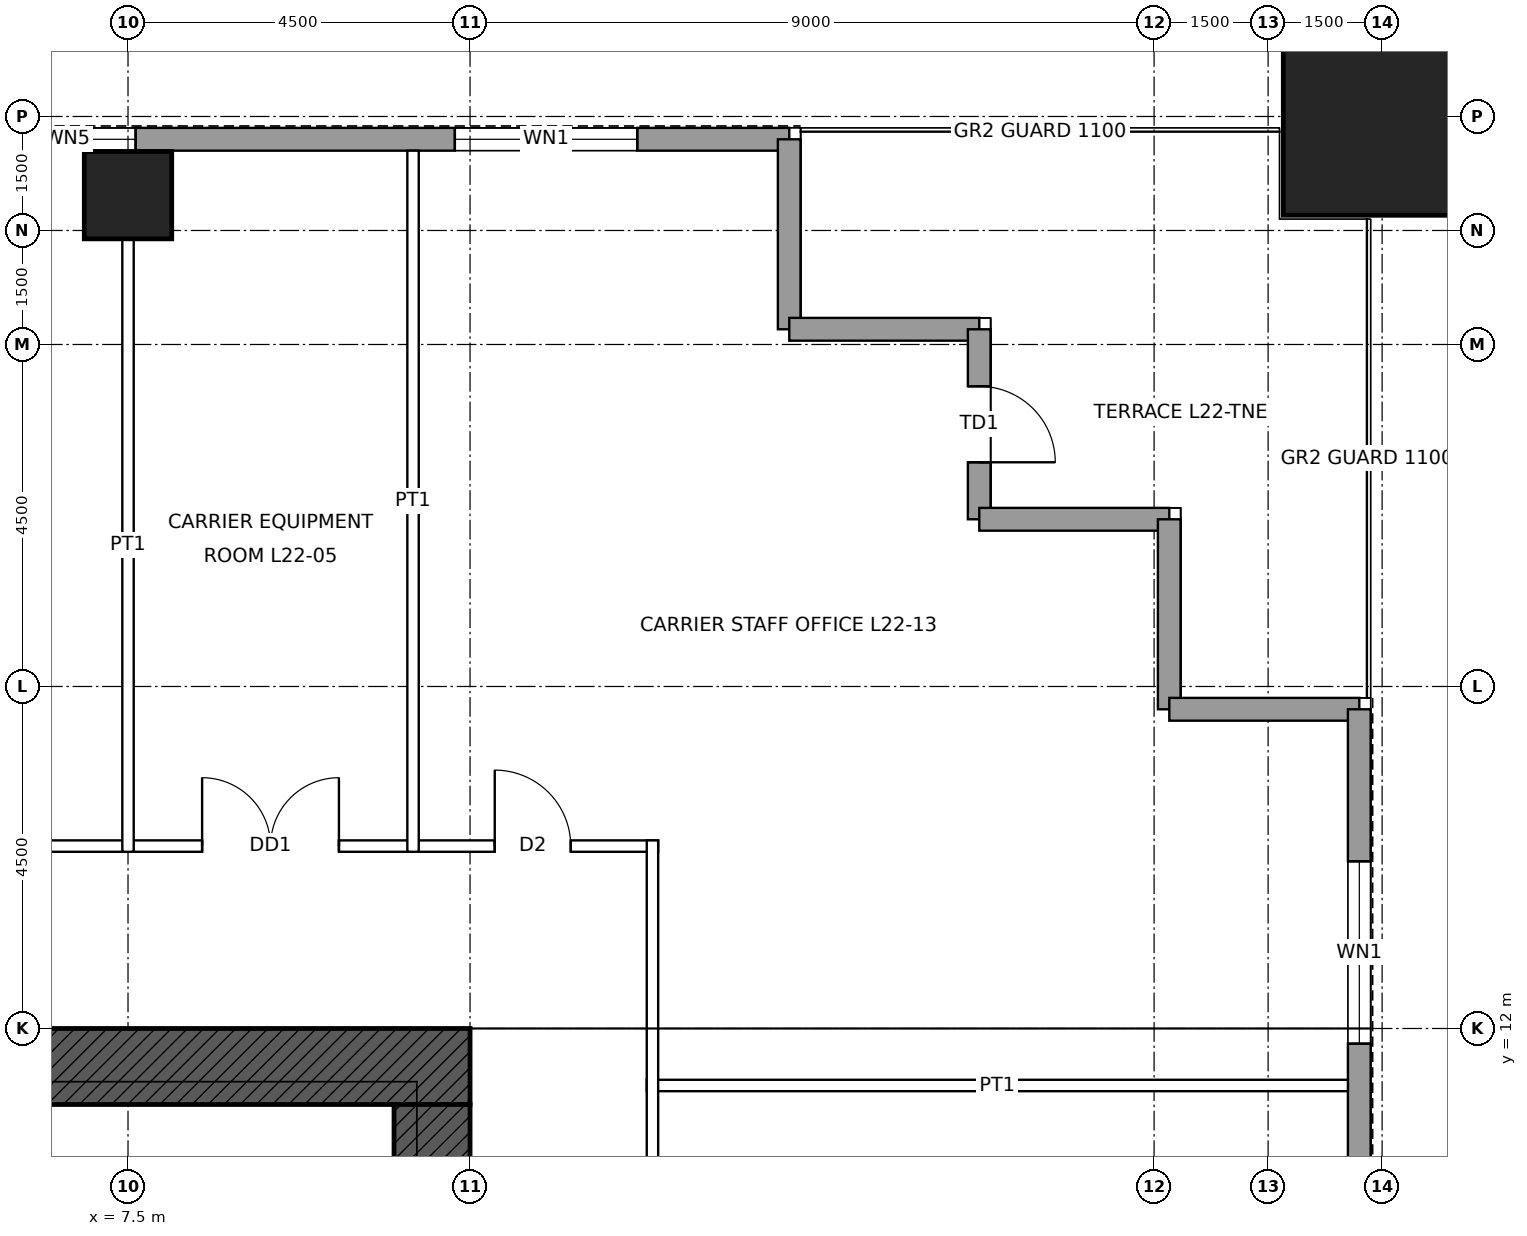
"""IFC4 building model, lengths in metres.
Left out: names, types, materials, properties, quantities, classifications, styles, units other than length and angle.
Written with IfcOpenShell. Run it as: python <this file> out.ifc"""

import sys

from ifc_helpers import new_model, si_unit, direction, frame, frame_2d, origin, origin_2d, place, context, subcontext, project, spatial, rectangle, hollow_rectangle, extrude, element, fill, save


model = new_model("IFC4")
c1 = context("Model", 3, precision=1e-05, world=origin(), true_north=direction((0.0, 1.0)))
c2 = subcontext(c1, "Body", "Model", "MODEL_VIEW")
j1 = project(units=[si_unit("LENGTHUNIT", "METRE"), si_unit("PLANEANGLEUNIT", "RADIAN")], contexts=[c1])
p1 = place(None, origin())
s1 = spatial("IfcSite", under=j1, at=p1, CompositionType="ELEMENT")
p2 = place(p1, origin())
s2 = spatial("IfcBuilding", under=s1, at=p2, CompositionType="ELEMENT")
p3 = place(p2, frame((0.0, 0.0, 113.4)))
s3 = spatial("IfcBuildingStorey", under=s2, at=p3, CompositionType="ELEMENT", Elevation=113.4)
p4 = place(p3, frame((24.0, 24.0, 0.0), z_axis=(0.0, 0.0, 1.0), x_axis=(1.0, 0.0, 0.0)))
e1 = element("IfcColumn", 1, at=p4, inside=s3, PredefinedType="COLUMN", context=c2, shape_type="SweptSolid", body=[
    extrude(hollow_rectangle(XDim=2.6, YDim=2.6, WallThickness=0.13, at=origin_2d()), origin(), (0.0, 0.0, 1.0), 4.5),
])
p5 = place(p3, frame((7.5, 22.965, 0.0), z_axis=(0.0, 0.0, 1.0), x_axis=(1.0, 0.0, 0.0)))
e2 = element("IfcColumn", 2, at=p5, inside=s3, PredefinedType="COLUMN", context=c2, shape_type="SweptSolid", body=[
    extrude(hollow_rectangle(XDim=1.15, YDim=1.15, WallThickness=0.075, at=origin_2d()), origin(), (0.0, 0.0, 1.0), 4.5),
])
p6 = place(p3, frame((-12.0, 11.5, 0.0), z_axis=(0.0, 0.0, 1.0), x_axis=(1.0, 0.0, 0.0)))
e3 = element("IfcWall", 3, at=p6, inside=s3, PredefinedType="SHEAR", context=c2, shape_type="SweptSolid", body=[
    extrude(rectangle(XDim=24.0, YDim=1.0, at=frame_2d((12.0, 0.0))), origin(), (0.0, 0.0, 1.0), 4.5),
])
p7 = place(p6, frame((6.25, 0.0, 0.0)))
e4 = element("IfcOpeningElement", 4, at=p7, cuts=e3, PredefinedType="OPENING", context=c2, shape_type="SweptSolid", body=[
    extrude(rectangle(XDim=1.0, YDim=2.4, at=frame_2d((0.5, 1.2))), frame((0.0, 0.51, 0.0), z_axis=(0.0, -1.0, 0.0), x_axis=(1.0, 0.0, 0.0)), (0.0, 0.0, 1.0), 1.02),
])
p8 = place(p6, frame((16.75, 0.0, 0.0)))
e5 = element("IfcOpeningElement", 5, at=p8, cuts=e3, PredefinedType="OPENING", context=c2, shape_type="SweptSolid", body=[
    extrude(rectangle(XDim=1.0, YDim=2.4, at=frame_2d((0.5, 1.2))), frame((0.0, 0.51, 0.0), z_axis=(0.0, -1.0, 0.0), x_axis=(1.0, 0.0, 0.0)), (0.0, 0.0, 1.0), 1.02),
])
p9 = place(p3, frame((11.5, 11.0, 0.0), z_axis=(0.0, 0.0, 1.0), x_axis=(0.0, -1.0, 0.0)))
e6 = element("IfcWall", 6, at=p9, inside=s3, PredefinedType="SHEAR", context=c2, shape_type="SweptSolid", body=[
    extrude(rectangle(XDim=22.0, YDim=1.0, at=frame_2d((11.0, 0.0))), origin(), (0.0, 0.0, 1.0), 4.5),
])
p10 = place(p9, frame((10.5, 0.0, 0.0)))
e7 = element("IfcOpeningElement", 7, at=p10, cuts=e6, PredefinedType="OPENING", context=c2, shape_type="SweptSolid", body=[
    extrude(rectangle(XDim=1.0, YDim=2.4, at=frame_2d((0.5, 1.2))), frame((0.0, 0.51, 0.0), z_axis=(0.0, -1.0, 0.0), x_axis=(1.0, 0.0, 0.0)), (0.0, 0.0, 1.0), 1.02),
])
p11 = place(p3, frame((-16.2, 23.7, 0.0), z_axis=(0.0, 0.0, 1.0), x_axis=(1.0, 0.0, 0.0)))
e8 = element("IfcWall", 8, at=p11, inside=s3, PredefinedType="SOLIDWALL", context=c2, shape_type="SweptSolid", body=[
    extrude(rectangle(XDim=32.4, YDim=0.3, at=frame_2d((16.2, 0.0))), origin(), (0.0, 0.0, 1.0), 4.3),
])
p12 = place(p11, frame((2.0, 0.0, 1.0)))
e9 = element("IfcOpeningElement", 9, at=p12, cuts=e8, PredefinedType="OPENING", context=c2, shape_type="SweptSolid", body=[
    extrude(rectangle(XDim=2.4, YDim=1.2, at=frame_2d((1.2, 0.6))), frame((0.0, 0.16, 0.0), z_axis=(0.0, -1.0, 0.0), x_axis=(1.0, 0.0, 0.0)), (0.0, 0.0, 1.0), 0.32),
])
p13 = place(p11, frame((8.6, 0.0, 1.0)))
e10 = element("IfcOpeningElement", 10, at=p13, cuts=e8, PredefinedType="OPENING", context=c2, shape_type="SweptSolid", body=[
    extrude(rectangle(XDim=1.8, YDim=1.2, at=frame_2d((0.9, 0.6))), frame((0.0, 0.16, 0.0), z_axis=(0.0, -1.0, 0.0), x_axis=(1.0, 0.0, 0.0)), (0.0, 0.0, 1.0), 0.32),
])
p14 = place(p11, frame((10.7, 0.0, 1.0)))
e11 = element("IfcOpeningElement", 11, at=p14, cuts=e8, PredefinedType="OPENING", context=c2, shape_type="SweptSolid", body=[
    extrude(rectangle(XDim=2.4, YDim=1.2, at=frame_2d((1.2, 0.6))), frame((0.0, 0.16, 0.0), z_axis=(0.0, -1.0, 0.0), x_axis=(1.0, 0.0, 0.0)), (0.0, 0.0, 1.0), 0.32),
])
p15 = place(p11, frame((13.4, 0.0, 1.0)))
e12 = element("IfcOpeningElement", 12, at=p15, cuts=e8, PredefinedType="OPENING", context=c2, shape_type="SweptSolid", body=[
    extrude(rectangle(XDim=2.4, YDim=1.2, at=frame_2d((1.2, 0.6))), frame((0.0, 0.16, 0.0), z_axis=(0.0, -1.0, 0.0), x_axis=(1.0, 0.0, 0.0)), (0.0, 0.0, 1.0), 0.32),
])
p16 = place(p11, frame((16.6, 0.0, 1.0)))
e13 = element("IfcOpeningElement", 13, at=p16, cuts=e8, PredefinedType="OPENING", context=c2, shape_type="SweptSolid", body=[
    extrude(rectangle(XDim=2.4, YDim=1.2, at=frame_2d((1.2, 0.6))), frame((0.0, 0.16, 0.0), z_axis=(0.0, -1.0, 0.0), x_axis=(1.0, 0.0, 0.0)), (0.0, 0.0, 1.0), 0.32),
])
p17 = place(p11, frame((19.3, 0.0, 1.0)))
e14 = element("IfcOpeningElement", 14, at=p17, cuts=e8, PredefinedType="OPENING", context=c2, shape_type="SweptSolid", body=[
    extrude(rectangle(XDim=2.4, YDim=1.2, at=frame_2d((1.2, 0.6))), frame((0.0, 0.16, 0.0), z_axis=(0.0, -1.0, 0.0), x_axis=(1.0, 0.0, 0.0)), (0.0, 0.0, 1.0), 0.32),
])
p18 = place(p11, frame((22.0, 0.0, 1.0)))
e15 = element("IfcOpeningElement", 15, at=p18, cuts=e8, PredefinedType="OPENING", context=c2, shape_type="SweptSolid", body=[
    extrude(rectangle(XDim=1.8, YDim=1.2, at=frame_2d((0.9, 0.6))), frame((0.0, 0.16, 0.0), z_axis=(0.0, -1.0, 0.0), x_axis=(1.0, 0.0, 0.0)), (0.0, 0.0, 1.0), 0.32),
])
p19 = place(p11, frame((28.0, 0.0, 1.0)))
e16 = element("IfcOpeningElement", 16, at=p19, cuts=e8, PredefinedType="OPENING", context=c2, shape_type="SweptSolid", body=[
    extrude(rectangle(XDim=2.4, YDim=1.2, at=frame_2d((1.2, 0.6))), frame((0.0, 0.16, 0.0), z_axis=(0.0, -1.0, 0.0), x_axis=(1.0, 0.0, 0.0)), (0.0, 0.0, 1.0), 0.32),
])
for number, where, z_axis, x_axis in (
    (17, (16.2, 23.7, 0.0), (0.0, 0.0, 1.0), (0.0, -1.0, 0.0)),
    (18, (16.2, 21.2, 0.0), (0.0, 0.0, 1.0), (1.0, 0.0, 0.0)),
):
    element("IfcWall", number, at=place(p3, frame(where, z_axis=z_axis, x_axis=x_axis)), inside=s3, PredefinedType="SOLIDWALL", context=c2, shape_type="SweptSolid", body=[
        extrude(rectangle(XDim=2.5, YDim=0.3, at=frame_2d((1.25, 0.0))), origin(), (0.0, 0.0, 1.0), 4.3),
    ])
p20 = place(p3, frame((18.7, 21.2, 0.0), z_axis=(0.0, 0.0, 1.0), x_axis=(0.0, -1.0, 0.0)))
e19 = element("IfcWall", 19, at=p20, inside=s3, PredefinedType="SOLIDWALL", context=c2, shape_type="SweptSolid", body=[
    extrude(rectangle(XDim=2.5, YDim=0.3, at=frame_2d((1.25, 0.0))), origin(), (0.0, 0.0, 1.0), 4.3),
])
p21 = place(p20, frame((0.75, 0.0, 0.0)))
e20 = element("IfcOpeningElement", 20, at=p21, cuts=e19, PredefinedType="OPENING", context=c2, shape_type="SweptSolid", body=[
    extrude(rectangle(XDim=1.0, YDim=2.4, at=frame_2d((0.5, 1.2))), frame((0.0, 0.16, 0.0), z_axis=(0.0, -1.0, 0.0), x_axis=(1.0, 0.0, 0.0)), (0.0, 0.0, 1.0), 0.32),
])
for number, where, z_axis, x_axis in (
    (21, (18.7, 18.7, 0.0), (0.0, 0.0, 1.0), (1.0, 0.0, 0.0)),
    (22, (21.2, 18.7, 0.0), (0.0, 0.0, 1.0), (0.0, -1.0, 0.0)),
    (23, (21.2, 16.2, 0.0), (0.0, 0.0, 1.0), (1.0, 0.0, 0.0)),
):
    element("IfcWall", number, at=place(p3, frame(where, z_axis=z_axis, x_axis=x_axis)), inside=s3, PredefinedType="SOLIDWALL", context=c2, shape_type="SweptSolid", body=[
        extrude(rectangle(XDim=2.5, YDim=0.3, at=frame_2d((1.25, 0.0))), origin(), (0.0, 0.0, 1.0), 4.3),
    ])
p22 = place(p3, frame((23.7, 16.2, 0.0), z_axis=(0.0, 0.0, 1.0), x_axis=(0.0, -1.0, 0.0)))
e24 = element("IfcWall", 24, at=p22, inside=s3, PredefinedType="SOLIDWALL", context=c2, shape_type="SweptSolid", body=[
    extrude(rectangle(XDim=32.4, YDim=0.3, at=frame_2d((16.2, 0.0))), origin(), (0.0, 0.0, 1.0), 4.3),
])
p23 = place(p22, frame((2.0, 0.0, 1.0)))
e25 = element("IfcOpeningElement", 25, at=p23, cuts=e24, PredefinedType="OPENING", context=c2, shape_type="SweptSolid", body=[
    extrude(rectangle(XDim=2.4, YDim=1.2, at=frame_2d((1.2, 0.6))), frame((0.0, 0.16, 0.0), z_axis=(0.0, -1.0, 0.0), x_axis=(1.0, 0.0, 0.0)), (0.0, 0.0, 1.0), 0.32),
])
p24 = place(p22, frame((8.6, 0.0, 1.0)))
e26 = element("IfcOpeningElement", 26, at=p24, cuts=e24, PredefinedType="OPENING", context=c2, shape_type="SweptSolid", body=[
    extrude(rectangle(XDim=1.8, YDim=1.2, at=frame_2d((0.9, 0.6))), frame((0.0, 0.16, 0.0), z_axis=(0.0, -1.0, 0.0), x_axis=(1.0, 0.0, 0.0)), (0.0, 0.0, 1.0), 0.32),
])
p25 = place(p22, frame((10.7, 0.0, 1.0)))
e27 = element("IfcOpeningElement", 27, at=p25, cuts=e24, PredefinedType="OPENING", context=c2, shape_type="SweptSolid", body=[
    extrude(rectangle(XDim=2.4, YDim=1.2, at=frame_2d((1.2, 0.6))), frame((0.0, 0.16, 0.0), z_axis=(0.0, -1.0, 0.0), x_axis=(1.0, 0.0, 0.0)), (0.0, 0.0, 1.0), 0.32),
])
p26 = place(p22, frame((13.4, 0.0, 1.0)))
e28 = element("IfcOpeningElement", 28, at=p26, cuts=e24, PredefinedType="OPENING", context=c2, shape_type="SweptSolid", body=[
    extrude(rectangle(XDim=2.4, YDim=1.2, at=frame_2d((1.2, 0.6))), frame((0.0, 0.16, 0.0), z_axis=(0.0, -1.0, 0.0), x_axis=(1.0, 0.0, 0.0)), (0.0, 0.0, 1.0), 0.32),
])
p27 = place(p22, frame((16.6, 0.0, 1.0)))
e29 = element("IfcOpeningElement", 29, at=p27, cuts=e24, PredefinedType="OPENING", context=c2, shape_type="SweptSolid", body=[
    extrude(rectangle(XDim=2.4, YDim=1.2, at=frame_2d((1.2, 0.6))), frame((0.0, 0.16, 0.0), z_axis=(0.0, -1.0, 0.0), x_axis=(1.0, 0.0, 0.0)), (0.0, 0.0, 1.0), 0.32),
])
p28 = place(p22, frame((19.3, 0.0, 1.0)))
e30 = element("IfcOpeningElement", 30, at=p28, cuts=e24, PredefinedType="OPENING", context=c2, shape_type="SweptSolid", body=[
    extrude(rectangle(XDim=2.4, YDim=1.2, at=frame_2d((1.2, 0.6))), frame((0.0, 0.16, 0.0), z_axis=(0.0, -1.0, 0.0), x_axis=(1.0, 0.0, 0.0)), (0.0, 0.0, 1.0), 0.32),
])
p29 = place(p22, frame((22.0, 0.0, 1.0)))
e31 = element("IfcOpeningElement", 31, at=p29, cuts=e24, PredefinedType="OPENING", context=c2, shape_type="SweptSolid", body=[
    extrude(rectangle(XDim=1.8, YDim=1.2, at=frame_2d((0.9, 0.6))), frame((0.0, 0.16, 0.0), z_axis=(0.0, -1.0, 0.0), x_axis=(1.0, 0.0, 0.0)), (0.0, 0.0, 1.0), 0.32),
])
p30 = place(p22, frame((28.0, 0.0, 1.0)))
e32 = element("IfcOpeningElement", 32, at=p30, cuts=e24, PredefinedType="OPENING", context=c2, shape_type="SweptSolid", body=[
    extrude(rectangle(XDim=2.4, YDim=1.2, at=frame_2d((1.2, 0.6))), frame((0.0, 0.16, 0.0), z_axis=(0.0, -1.0, 0.0), x_axis=(1.0, 0.0, 0.0)), (0.0, 0.0, 1.0), 0.32),
])
p31 = place(p3, frame((14.325, 11.25, 0.0), z_axis=(0.0, 0.0, 1.0), x_axis=(1.0, 0.0, 0.0)))
e33 = element("IfcWall", 33, at=p31, inside=s3, PredefinedType="PARTITIONING", context=c2, shape_type="SweptSolid", body=[
    extrude(rectangle(XDim=9.225, YDim=0.15, at=frame_2d((4.613, 0.0))), origin(), (0.0, 0.0, 1.0), 3.431),
])
p32 = place(p3, frame((-14.475, 14.4, 0.0), z_axis=(0.0, 0.0, 1.0), x_axis=(1.0, 0.0, 0.0)))
e34 = element("IfcWall", 34, at=p32, inside=s3, PredefinedType="PARTITIONING", context=c2, shape_type="SweptSolid", body=[
    extrude(rectangle(XDim=28.95, YDim=0.15, at=frame_2d((14.475, 0.0))), origin(), (0.0, 0.0, 1.0), 4.3),
])
p33 = place(p32, frame((4.2, 0.0, 0.0)))
e35 = element("IfcOpeningElement", 35, at=p33, cuts=e34, PredefinedType="OPENING", context=c2, shape_type="SweptSolid", body=[
    extrude(rectangle(XDim=1.8, YDim=2.4, at=frame_2d((0.9, 1.2))), frame((0.0, 0.085, 0.0), z_axis=(0.0, -1.0, 0.0), x_axis=(1.0, 0.0, 0.0)), (0.0, 0.0, 1.0), 0.17),
])
p34 = place(p32, frame((9.825, 0.0, 0.0)))
e36 = element("IfcOpeningElement", 36, at=p34, cuts=e34, PredefinedType="OPENING", context=c2, shape_type="SweptSolid", body=[
    extrude(rectangle(XDim=1.8, YDim=2.4, at=frame_2d((0.9, 1.2))), frame((0.0, 0.085, 0.0), z_axis=(0.0, -1.0, 0.0), x_axis=(1.0, 0.0, 0.0)), (0.0, 0.0, 1.0), 0.17),
])
p35 = place(p32, frame((17.325, 0.0, 0.0)))
e37 = element("IfcOpeningElement", 37, at=p35, cuts=e34, PredefinedType="OPENING", context=c2, shape_type="SweptSolid", body=[
    extrude(rectangle(XDim=1.8, YDim=2.4, at=frame_2d((0.9, 1.2))), frame((0.0, 0.085, 0.0), z_axis=(0.0, -1.0, 0.0), x_axis=(1.0, 0.0, 0.0)), (0.0, 0.0, 1.0), 0.17),
])
p36 = place(p32, frame((22.95, 0.0, 0.0)))
e38 = element("IfcOpeningElement", 38, at=p36, cuts=e34, PredefinedType="OPENING", context=c2, shape_type="SweptSolid", body=[
    extrude(rectangle(XDim=1.8, YDim=2.4, at=frame_2d((0.9, 1.2))), frame((0.0, 0.085, 0.0), z_axis=(0.0, -1.0, 0.0), x_axis=(1.0, 0.0, 0.0)), (0.0, 0.0, 1.0), 0.17),
])
p37 = place(p32, frame((26.8, 0.0, 0.0)))
e39 = element("IfcOpeningElement", 39, at=p37, cuts=e34, PredefinedType="OPENING", context=c2, shape_type="SweptSolid", body=[
    extrude(rectangle(XDim=1.0, YDim=2.1, at=frame_2d((0.5, 1.05))), frame((0.0, 0.085, 0.0), z_axis=(0.0, -1.0, 0.0), x_axis=(1.0, 0.0, 0.0)), (0.0, 0.0, 1.0), 0.17),
])
p38 = place(p32, frame((1.15, 0.0, 0.0)))
e40 = element("IfcOpeningElement", 40, at=p38, cuts=e34, PredefinedType="OPENING", context=c2, shape_type="SweptSolid", body=[
    extrude(rectangle(XDim=1.0, YDim=2.1, at=frame_2d((0.5, 1.05))), frame((0.0, 0.085, 0.0), z_axis=(0.0, -1.0, 0.0), x_axis=(1.0, 0.0, 0.0)), (0.0, 0.0, 1.0), 0.17),
])
p39 = place(p3, frame((7.5, 14.325, 0.0), z_axis=(0.0, 0.0, 1.0), x_axis=(0.0, 1.0, 0.0)))
e41 = element("IfcWall", 41, at=p39, inside=s3, PredefinedType="PARTITIONING", context=c2, shape_type="SweptSolid", body=[
    extrude(rectangle(XDim=8.065, YDim=0.15, at=frame_2d((4.032, 0.0))), origin(), (0.0, 0.0, 1.0), 3.431),
])
p40 = place(p3, frame((11.25, 14.325, 0.0), z_axis=(0.0, 0.0, 1.0), x_axis=(0.0, 1.0, 0.0)))
e42 = element("IfcWall", 42, at=p40, inside=s3, PredefinedType="PARTITIONING", context=c2, shape_type="SweptSolid", body=[
    extrude(rectangle(XDim=9.225, YDim=0.15, at=frame_2d((4.613, 0.0))), origin(), (0.0, 0.0, 1.0), 3.431),
])
p41 = place(p3, frame((14.4, -14.475, 0.0), z_axis=(0.0, 0.0, 1.0), x_axis=(0.0, 1.0, 0.0)))
e43 = element("IfcWall", 43, at=p41, inside=s3, PredefinedType="PARTITIONING", context=c2, shape_type="SweptSolid", body=[
    extrude(rectangle(XDim=28.95, YDim=0.15, at=frame_2d((14.475, 0.0))), origin(), (0.0, 0.0, 1.0), 4.3),
])
p42 = place(p41, frame((19.2, 0.0, 0.0)))
e44 = element("IfcOpeningElement", 44, at=p42, cuts=e43, PredefinedType="OPENING", context=c2, shape_type="SweptSolid", body=[
    extrude(rectangle(XDim=1.8, YDim=2.4, at=frame_2d((0.9, 1.2))), frame((0.0, 0.085, 0.0), z_axis=(0.0, -1.0, 0.0), x_axis=(1.0, 0.0, 0.0)), (0.0, 0.0, 1.0), 0.17),
])
p43 = place(p41, frame((7.95, 0.0, 0.0)))
e45 = element("IfcOpeningElement", 45, at=p43, cuts=e43, PredefinedType="OPENING", context=c2, shape_type="SweptSolid", body=[
    extrude(rectangle(XDim=1.8, YDim=2.4, at=frame_2d((0.9, 1.2))), frame((0.0, 0.085, 0.0), z_axis=(0.0, -1.0, 0.0), x_axis=(1.0, 0.0, 0.0)), (0.0, 0.0, 1.0), 0.17),
])
p44 = place(p18, origin())
e46 = element("IfcWindow", 46, at=p44, inside=s3, PartitioningType="SINGLE_PANEL", PredefinedType="WINDOW", context=c2, shape_type="SweptSolid", body=[
    extrude(rectangle(XDim=1.8, YDim=1.2, at=frame_2d((0.9, 0.6))), frame((0.0, 0.03, 0.0), z_axis=(0.0, -1.0, 0.0), x_axis=(1.0, 0.0, 0.0)), (0.0, 0.0, 1.0), 0.06),
])
fill(e15, e46)
p45 = place(p19, origin())
e47 = element("IfcWindow", 47, at=p45, inside=s3, PartitioningType="SINGLE_PANEL", PredefinedType="WINDOW", context=c2, shape_type="SweptSolid", body=[
    extrude(rectangle(XDim=2.4, YDim=1.2, at=frame_2d((1.2, 0.6))), frame((0.0, 0.03, 0.0), z_axis=(0.0, -1.0, 0.0), x_axis=(1.0, 0.0, 0.0)), (0.0, 0.0, 1.0), 0.06),
])
fill(e16, e47)
p46 = place(p21, origin())
e48 = element("IfcDoor", 48, at=p46, inside=s3, OperationType="SINGLE_SWING_RIGHT", PredefinedType="DOOR", context=c2, shape_type="SweptSolid", body=[
    extrude(rectangle(XDim=1.0, YDim=2.4, at=frame_2d((0.5, 1.2))), frame((0.0, 0.025, 0.0), z_axis=(0.0, -1.0, 0.0), x_axis=(1.0, 0.0, 0.0)), (0.0, 0.0, 1.0), 0.05),
])
fill(e20, e48)
p47 = place(p23, origin())
e49 = element("IfcWindow", 49, at=p47, inside=s3, PartitioningType="SINGLE_PANEL", PredefinedType="WINDOW", context=c2, shape_type="SweptSolid", body=[
    extrude(rectangle(XDim=2.4, YDim=1.2, at=frame_2d((1.2, 0.6))), frame((0.0, 0.03, 0.0), z_axis=(0.0, -1.0, 0.0), x_axis=(1.0, 0.0, 0.0)), (0.0, 0.0, 1.0), 0.06),
])
fill(e25, e49)
p48 = place(p36, origin())
e50 = element("IfcDoor", 50, at=p48, inside=s3, OperationType="DOUBLE_DOOR_SINGLE_SWING", PredefinedType="DOOR", context=c2, shape_type="SweptSolid", body=[
    extrude(rectangle(XDim=1.8, YDim=2.4, at=frame_2d((0.9, 1.2))), frame((0.0, 0.025, 0.0), z_axis=(0.0, -1.0, 0.0), x_axis=(1.0, 0.0, 0.0)), (0.0, 0.0, 1.0), 0.05),
])
fill(e38, e50)
p49 = place(p37, origin())
e51 = element("IfcDoor", 51, at=p49, inside=s3, OperationType="SINGLE_SWING_LEFT", PredefinedType="DOOR", context=c2, shape_type="SweptSolid", body=[
    extrude(rectangle(XDim=1.0, YDim=2.1, at=frame_2d((0.5, 1.05))), frame((0.0, 0.025, 0.0), z_axis=(0.0, -1.0, 0.0), x_axis=(1.0, 0.0, 0.0)), (0.0, 0.0, 1.0), 0.05),
])
fill(e39, e51)
save(model, sys.argv[1])
